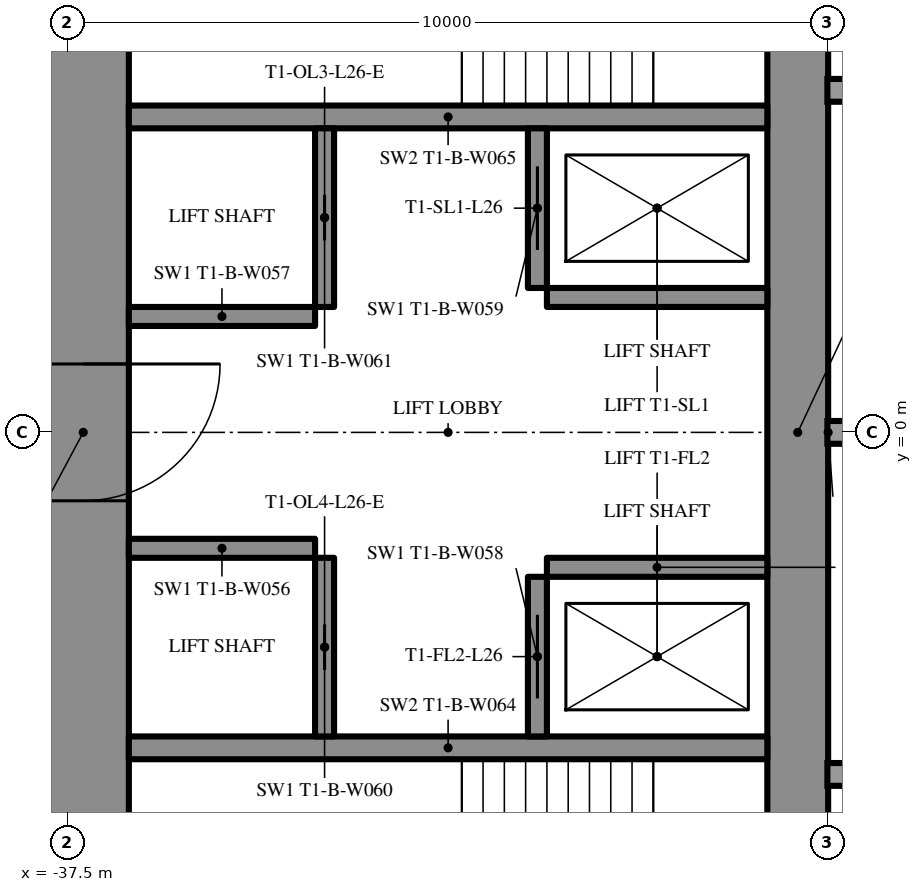
"""IFC4 building model, lengths in metres.
Left out: names, types, materials, properties, quantities, classifications, styles, units other than length and angle.
Written with IfcOpenShell. Run it as: python <this file> out.ifc"""

import sys

from ifc_helpers import new_model, si_unit, direction, frame, frame_2d, origin, place, context, subcontext, project, spatial, rectangle, extrude, element, fill, save


model = new_model("IFC4")
c1 = context("Model", 3, precision=1e-05, world=origin(), true_north=direction((0.0, 1.0)))
c2 = subcontext(c1, "Body", "Model", "MODEL_VIEW")
j1 = project(units=[si_unit("LENGTHUNIT", "METRE"), si_unit("PLANEANGLEUNIT", "RADIAN")], contexts=[c1])
p1 = place(None, origin())
s1 = spatial("IfcSite", under=j1, at=p1, CompositionType="ELEMENT")
p2 = place(p1, origin())
s2 = spatial("IfcBuilding", under=s1, at=p2, CompositionType="ELEMENT")
p3 = place(p2, frame((0.0, 0.0, 101.1)))
s3 = spatial("IfcBuildingStorey", under=s2, at=p3, CompositionType="ELEMENT", Elevation=101.1)
p4 = place(p3, frame((-27.9, 8.6, 0.0), z_axis=(0.0, 0.0, 1.0), x_axis=(0.0, -1.0, 0.0)))
e1 = element("IfcWall", 1, at=p4, inside=s3, PredefinedType="SHEAR", context=c2, shape_type="SweptSolid", body=[
    extrude(rectangle(XDim=17.2, YDim=0.8, at=frame_2d((8.6, 0.0))), origin(), (0.0, 0.0, 1.0), 3.5),
])
p5 = place(p4, frame((2.45, 0.0, 0.6)))
e2 = element("IfcOpeningElement", 2, at=p5, cuts=e1, PredefinedType="OPENING", context=c2, shape_type="SweptSolid", body=[
    extrude(rectangle(XDim=0.6, YDim=2.1, at=frame_2d((0.3, 1.05))), frame((0.0, 0.41, 0.0), z_axis=(0.0, -1.0, 0.0), x_axis=(1.0, 0.0, 0.0)), (0.0, 0.0, 1.0), 0.82),
])
p6 = place(p4, frame((14.15, 0.0, 0.6)))
e3 = element("IfcOpeningElement", 3, at=p6, cuts=e1, PredefinedType="OPENING", context=c2, shape_type="SweptSolid", body=[
    extrude(rectangle(XDim=0.6, YDim=2.1, at=frame_2d((0.3, 1.05))), frame((0.0, 0.41, 0.0), z_axis=(0.0, -1.0, 0.0), x_axis=(1.0, 0.0, 0.0)), (0.0, 0.0, 1.0), 0.82),
])
p7 = place(p3, frame((-37.3, 8.6, 0.0), z_axis=(0.0, 0.0, 1.0), x_axis=(0.0, -1.0, 0.0)))
e4 = element("IfcWall", 4, at=p7, inside=s3, PredefinedType="SHEAR", context=c2, shape_type="SweptSolid", body=[
    extrude(rectangle(XDim=17.2, YDim=1.2, at=frame_2d((8.6, 0.0))), origin(), (0.0, 0.0, 1.0), 3.5),
])
p8 = place(p7, frame((7.7, 0.0, 0.0)))
e5 = element("IfcOpeningElement", 5, at=p8, cuts=e4, PredefinedType="OPENING", context=c2, shape_type="SweptSolid", body=[
    extrude(rectangle(XDim=1.8, YDim=2.2, at=frame_2d((0.9, 1.1))), frame((0.0, 0.61, 0.0), z_axis=(0.0, -1.0, 0.0), x_axis=(1.0, 0.0, 0.0)), (0.0, 0.0, 1.0), 1.22),
])
for number, where, z_axis, x_axis in (
    (6, (-28.3, 4.15, 0.0), (0.0, 0.0, 1.0), (-1.0, 0.0, 0.0)),
    (7, (-28.3, -4.15, 0.0), (0.0, 0.0, 1.0), (-1.0, 0.0, 0.0)),
):
    element("IfcWall", number, at=place(p3, frame(where, z_axis=z_axis, x_axis=x_axis)), inside=s3, PredefinedType="SHEAR", context=c2, shape_type="SweptSolid", body=[
        extrude(rectangle(XDim=8.4, YDim=0.3, at=frame_2d((4.2, 0.0))), origin(), (0.0, 0.0, 1.0), 3.5),
    ])
p9 = place(p3, frame((-31.325, 4.0, 0.0), z_axis=(0.0, 0.0, 1.0), x_axis=(0.0, -1.0, 0.0)))
e8 = element("IfcWall", 8, at=p9, inside=s3, PredefinedType="SHEAR", context=c2, shape_type="SweptSolid", body=[
    extrude(rectangle(XDim=2.1, YDim=0.25, at=frame_2d((1.05, 0.0))), origin(), (0.0, 0.0, 1.0), 3.5),
])
p10 = place(p9, frame((0.5, 0.0, 0.0)))
e9 = element("IfcOpeningElement", 9, at=p10, cuts=e8, PredefinedType="OPENING", context=c2, shape_type="SweptSolid", body=[
    extrude(rectangle(XDim=1.1, YDim=2.2, at=frame_2d((0.55, 1.1))), frame((0.0, 0.135, 0.0), z_axis=(0.0, -1.0, 0.0), x_axis=(1.0, 0.0, 0.0)), (0.0, 0.0, 1.0), 0.27),
])
p11 = place(p3, frame((-34.125, 4.0, 0.0), z_axis=(0.0, 0.0, 1.0), x_axis=(0.0, -1.0, 0.0)))
e10 = element("IfcWall", 10, at=p11, inside=s3, PredefinedType="SHEAR", context=c2, shape_type="SweptSolid", body=[
    extrude(rectangle(XDim=2.35, YDim=0.25, at=frame_2d((1.175, 0.0))), origin(), (0.0, 0.0, 1.0), 3.5),
])
p12 = place(p11, frame((0.875, 0.0, 0.0)))
e11 = element("IfcOpeningElement", 11, at=p12, cuts=e10, PredefinedType="OPENING", context=c2, shape_type="SweptSolid", body=[
    extrude(rectangle(XDim=0.6, YDim=2.0, at=frame_2d((0.3, 1.0))), frame((0.0, 0.135, 0.0), z_axis=(0.0, -1.0, 0.0), x_axis=(1.0, 0.0, 0.0)), (0.0, 0.0, 1.0), 0.27),
])
p13 = place(p3, frame((-28.3, 1.775, 0.0), z_axis=(0.0, 0.0, 1.0), x_axis=(-1.0, 0.0, 0.0)))
e12 = element("IfcWall", 12, at=p13, inside=s3, PredefinedType="SHEAR", context=c2, shape_type="SweptSolid", body=[
    extrude(rectangle(XDim=2.9, YDim=0.25, at=frame_2d((1.45, 0.0))), origin(), (0.0, 0.0, 1.0), 3.5),
])
p14 = place(p3, frame((-34.25, 1.525, 0.0), z_axis=(0.0, 0.0, 1.0), x_axis=(-1.0, 0.0, 0.0)))
e13 = element("IfcWall", 13, at=p14, inside=s3, PredefinedType="SHEAR", context=c2, shape_type="SweptSolid", body=[
    extrude(rectangle(XDim=2.45, YDim=0.25, at=frame_2d((1.225, 0.0))), origin(), (0.0, 0.0, 1.0), 3.5),
])
p15 = place(p3, frame((-31.325, -1.9, 0.0), z_axis=(0.0, 0.0, 1.0), x_axis=(0.0, -1.0, 0.0)))
e14 = element("IfcWall", 14, at=p15, inside=s3, PredefinedType="SHEAR", context=c2, shape_type="SweptSolid", body=[
    extrude(rectangle(XDim=2.1, YDim=0.25, at=frame_2d((1.05, 0.0))), origin(), (0.0, 0.0, 1.0), 3.5),
])
p16 = place(p15, frame((0.5, 0.0, 0.0)))
e15 = element("IfcOpeningElement", 15, at=p16, cuts=e14, PredefinedType="OPENING", context=c2, shape_type="SweptSolid", body=[
    extrude(rectangle(XDim=1.1, YDim=2.2, at=frame_2d((0.55, 1.1))), frame((0.0, 0.135, 0.0), z_axis=(0.0, -1.0, 0.0), x_axis=(1.0, 0.0, 0.0)), (0.0, 0.0, 1.0), 0.27),
])
p17 = place(p3, frame((-34.125, -1.65, 0.0), z_axis=(0.0, 0.0, 1.0), x_axis=(0.0, -1.0, 0.0)))
e16 = element("IfcWall", 16, at=p17, inside=s3, PredefinedType="SHEAR", context=c2, shape_type="SweptSolid", body=[
    extrude(rectangle(XDim=2.35, YDim=0.25, at=frame_2d((1.175, 0.0))), origin(), (0.0, 0.0, 1.0), 3.5),
])
p18 = place(p17, frame((0.875, 0.0, 0.0)))
e17 = element("IfcOpeningElement", 17, at=p18, cuts=e16, PredefinedType="OPENING", context=c2, shape_type="SweptSolid", body=[
    extrude(rectangle(XDim=0.6, YDim=2.0, at=frame_2d((0.3, 1.0))), frame((0.0, 0.135, 0.0), z_axis=(0.0, -1.0, 0.0), x_axis=(1.0, 0.0, 0.0)), (0.0, 0.0, 1.0), 0.27),
])
p19 = place(p3, frame((-28.3, -1.775, 0.0), z_axis=(0.0, 0.0, 1.0), x_axis=(-1.0, 0.0, 0.0)))
e18 = element("IfcWall", 18, at=p19, inside=s3, PredefinedType="SHEAR", context=c2, shape_type="SweptSolid", body=[
    extrude(rectangle(XDim=2.9, YDim=0.25, at=frame_2d((1.45, 0.0))), origin(), (0.0, 0.0, 1.0), 3.5),
])
p20 = place(p3, frame((-34.25, -1.525, 0.0), z_axis=(0.0, 0.0, 1.0), x_axis=(-1.0, 0.0, 0.0)))
e19 = element("IfcWall", 19, at=p20, inside=s3, PredefinedType="SHEAR", context=c2, shape_type="SweptSolid", body=[
    extrude(rectangle(XDim=2.45, YDim=0.25, at=frame_2d((1.225, 0.0))), origin(), (0.0, 0.0, 1.0), 3.5),
])
p21 = place(p3, frame((-27.2, 14.3, 0.0), z_axis=(0.0, 0.0, 1.0), x_axis=(-0.866026593062, -0.499997940104, 0.0)))
e20 = element("IfcWall", 20, at=p21, inside=s3, PredefinedType="SHEAR", context=c2, shape_type="SweptSolid", body=[
    extrude(rectangle(XDim=28.946, YDim=1.2, at=frame_2d((14.473, 0.0))), origin(), (0.0, 0.0, 1.0), 3.5),
])
p22 = place(p21, frame((4.6, 0.0, 0.0)))
e21 = element("IfcOpeningElement", 21, at=p22, cuts=e20, PredefinedType="OPENING", context=c2, shape_type="SweptSolid", body=[
    extrude(rectangle(XDim=1.0, YDim=2.2, at=frame_2d((0.5, 1.1))), frame((0.0, 0.61, 0.0), z_axis=(0.0, -1.0, 0.0), x_axis=(1.0, 0.0, 0.0)), (0.0, 0.0, 1.0), 1.22),
])
p23 = place(p21, frame((13.395, 0.0, 0.0)))
e22 = element("IfcOpeningElement", 22, at=p23, cuts=e20, PredefinedType="OPENING", context=c2, shape_type="SweptSolid", body=[
    extrude(rectangle(XDim=1.8, YDim=2.2, at=frame_2d((0.9, 1.1))), frame((0.0, 0.61, 0.0), z_axis=(0.0, -1.0, 0.0), x_axis=(1.0, 0.0, 0.0)), (0.0, 0.0, 1.0), 1.22),
])
p24 = place(p3, frame((-27.2, -14.3, 0.0), z_axis=(0.0, 0.0, 1.0), x_axis=(-0.866024021859, 0.500002393557, 0.0)))
e23 = element("IfcWall", 23, at=p24, inside=s3, PredefinedType="SHEAR", context=c2, shape_type="SweptSolid", body=[
    extrude(rectangle(XDim=27.907, YDim=1.2, at=frame_2d((13.954, 0.0))), origin(), (0.0, 0.0, 1.0), 3.5),
])
p25 = place(p24, frame((4.6, 0.0, 0.0)))
e24 = element("IfcOpeningElement", 24, at=p25, cuts=e23, PredefinedType="OPENING", context=c2, shape_type="SweptSolid", body=[
    extrude(rectangle(XDim=1.0, YDim=2.2, at=frame_2d((0.5, 1.1))), frame((0.0, 0.61, 0.0), z_axis=(0.0, -1.0, 0.0), x_axis=(1.0, 0.0, 0.0)), (0.0, 0.0, 1.0), 1.22),
])
p26 = place(p24, frame((13.395, 0.0, 0.0)))
e25 = element("IfcOpeningElement", 25, at=p26, cuts=e23, PredefinedType="OPENING", context=c2, shape_type="SweptSolid", body=[
    extrude(rectangle(XDim=1.8, YDim=2.2, at=frame_2d((0.9, 1.1))), frame((0.0, 0.61, 0.0), z_axis=(0.0, -1.0, 0.0), x_axis=(1.0, 0.0, 0.0)), (0.0, 0.0, 1.0), 1.22),
])
p27 = place(p3, frame((-36.92, -11.344, 0.0), z_axis=(0.0, 0.0, 1.0), x_axis=(-0.866028313256, 0.499994960614, 0.0)))
e26 = element("IfcWall", 26, at=p27, inside=s3, PredefinedType="PARTITIONING", context=c2, shape_type="SweptSolid", body=[
    extrude(rectangle(XDim=22.568, YDim=0.2, at=frame_2d((11.284, 0.0))), origin(), (0.0, 0.0, 1.0), 3.25),
])
p28 = place(p27, frame((21.018, 0.0, 0.0)))
e27 = element("IfcOpeningElement", 27, at=p28, cuts=e26, PredefinedType="OPENING", context=c2, shape_type="SweptSolid", body=[
    extrude(rectangle(XDim=0.95, YDim=2.2, at=frame_2d((0.475, 1.1))), frame((0.0, 0.11, 0.0), z_axis=(0.0, -1.0, 0.0), x_axis=(1.0, 0.0, 0.0)), (0.0, 0.0, 1.0), 0.22),
])
p29 = place(p27, frame((3.35, 0.0, 0.0)))
e28 = element("IfcOpeningElement", 28, at=p29, cuts=e26, PredefinedType="OPENING", context=c2, shape_type="SweptSolid", body=[
    extrude(rectangle(XDim=1.0, YDim=2.2, at=frame_2d((0.5, 1.1))), frame((0.0, 0.11, 0.0), z_axis=(0.0, -1.0, 0.0), x_axis=(1.0, 0.0, 0.0)), (0.0, 0.0, 1.0), 0.22),
])
p30 = place(p8, origin())
e29 = element("IfcDoor", 29, at=p30, inside=s3, OperationType="DOUBLE_DOOR_SINGLE_SWING", PredefinedType="DOOR", context=c2, shape_type="SweptSolid", body=[
    extrude(rectangle(XDim=1.8, YDim=2.2, at=frame_2d((0.9, 1.1))), frame((0.0, 0.025, 0.0), z_axis=(0.0, -1.0, 0.0), x_axis=(1.0, 0.0, 0.0)), (0.0, 0.0, 1.0), 0.05),
])
fill(e5, e29)
p31 = place(p10, origin())
e30 = element("IfcDoor", 30, at=p31, inside=s3, OperationType="SLIDING_TO_LEFT", PredefinedType="USERDEFINED", context=c2, shape_type="SweptSolid", body=[
    extrude(rectangle(XDim=1.1, YDim=2.2, at=frame_2d((0.55, 1.1))), frame((0.0, 0.025, 0.0), z_axis=(0.0, -1.0, 0.0), x_axis=(1.0, 0.0, 0.0)), (0.0, 0.0, 1.0), 0.05),
])
fill(e9, e30)
p32 = place(p16, origin())
e31 = element("IfcDoor", 31, at=p32, inside=s3, OperationType="SLIDING_TO_LEFT", PredefinedType="USERDEFINED", context=c2, shape_type="SweptSolid", body=[
    extrude(rectangle(XDim=1.1, YDim=2.2, at=frame_2d((0.55, 1.1))), frame((0.0, 0.025, 0.0), z_axis=(0.0, -1.0, 0.0), x_axis=(1.0, 0.0, 0.0)), (0.0, 0.0, 1.0), 0.05),
])
fill(e15, e31)
p33 = place(p12, origin())
e32 = element("IfcDoor", 32, at=p33, inside=s3, OperationType="SLIDING_TO_LEFT", PredefinedType="DOOR", context=c2, shape_type="SweptSolid", body=[
    extrude(rectangle(XDim=0.6, YDim=2.0, at=frame_2d((0.3, 1.0))), frame((0.0, 0.025, 0.0), z_axis=(0.0, -1.0, 0.0), x_axis=(1.0, 0.0, 0.0)), (0.0, 0.0, 1.0), 0.05),
])
fill(e11, e32)
p34 = place(p18, origin())
e33 = element("IfcDoor", 33, at=p34, inside=s3, OperationType="SLIDING_TO_LEFT", PredefinedType="DOOR", context=c2, shape_type="SweptSolid", body=[
    extrude(rectangle(XDim=0.6, YDim=2.0, at=frame_2d((0.3, 1.0))), frame((0.0, 0.025, 0.0), z_axis=(0.0, -1.0, 0.0), x_axis=(1.0, 0.0, 0.0)), (0.0, 0.0, 1.0), 0.05),
])
fill(e17, e33)
save(model, sys.argv[1])
